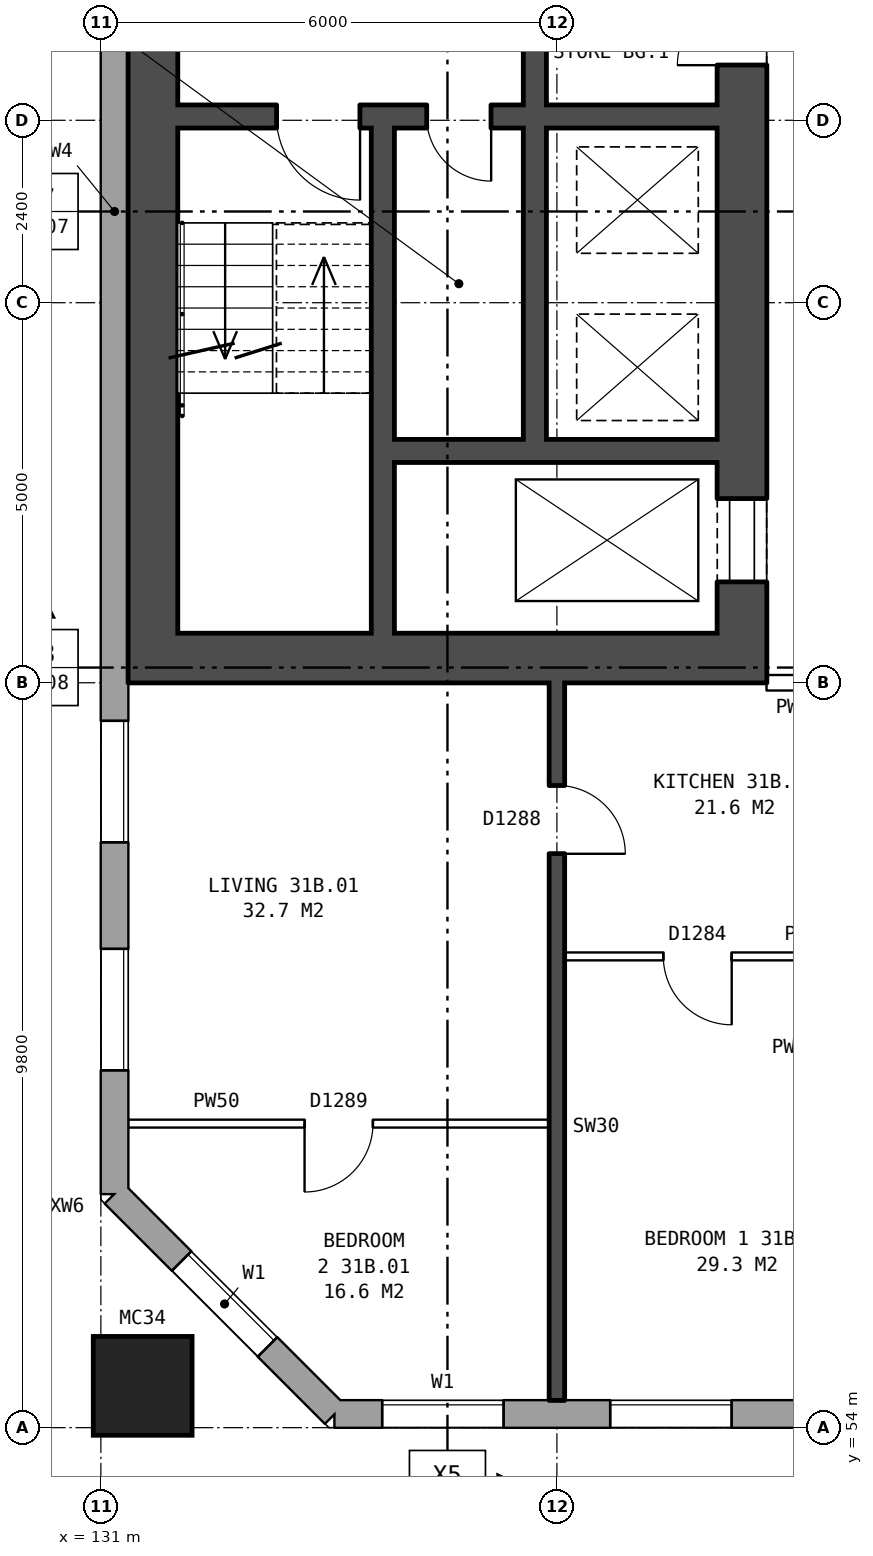
"""IFC4 building model, lengths in metres.
Left out: names, types, materials, properties, quantities, classifications, styles, units other than length and angle.
Written with IfcOpenShell. Run it as: python <this file> out.ifc"""

import sys

from ifc_helpers import new_model, si_unit, direction, frame, frame_2d, origin, origin_2d, place, context, subcontext, project, spatial, rectangle, hollow_rectangle, extrude, element, fill, save


model = new_model("IFC4")
c1 = context("Model", 3, precision=1e-05, world=origin(), true_north=direction((0.0, 1.0)))
c2 = subcontext(c1, "Body", "Model", "MODEL_VIEW")
j1 = project(units=[si_unit("LENGTHUNIT", "METRE"), si_unit("PLANEANGLEUNIT", "RADIAN")], contexts=[c1])
p1 = place(None, origin())
s1 = spatial("IfcSite", under=j1, at=p1, CompositionType="ELEMENT")
p2 = place(p1, origin())
s2 = spatial("IfcBuilding", under=s1, at=p2, CompositionType="ELEMENT")
p3 = place(p2, frame((0.0, 0.0, 111.9)))
s3 = spatial("IfcBuildingStorey", under=s2, at=p3, CompositionType="ELEMENT", Elevation=111.9)
p4 = place(p3, frame((131.55, 54.55, 0.0), z_axis=(0.0, 0.0, 1.0), x_axis=(1.0, 0.0, 0.0)))
e1 = element("IfcColumn", 1, at=p4, inside=s3, PredefinedType="COLUMN", context=c2, shape_type="SweptSolid", body=[
    extrude(hollow_rectangle(XDim=1.3, YDim=1.3, WallThickness=0.07, at=origin_2d()), origin(), (0.0, 0.0, 1.0), 3.1),
])
p5 = place(p3, frame((131.18, 57.075, 0.0), z_axis=(0.0, 0.0, 1.0), x_axis=(0.707106781187, -0.707106781187, 0.0)))
e2 = element("IfcWall", 2, at=p5, inside=s3, PredefinedType="STANDARD", context=c2, shape_type="SweptSolid", body=[
    extrude(rectangle(XDim=4.094, YDim=0.36, at=frame_2d((2.047, 0.0))), origin(), (0.0, 0.0, 1.0), 2.85),
])
p6 = place(p5, frame((1.247, 0.0, 0.8)))
e3 = element("IfcOpeningElement", 3, at=p6, cuts=e2, PredefinedType="OPENING", context=c2, shape_type="SweptSolid", body=[
    extrude(rectangle(XDim=1.6, YDim=1.8, at=frame_2d((0.8, 0.9))), frame((0.0, 0.19, 0.0), z_axis=(0.0, -1.0, 0.0), x_axis=(1.0, 0.0, 0.0)), (0.0, 0.0, 1.0), 0.38),
])
p7 = place(p3, frame((134.075, 54.18, 0.0), z_axis=(0.0, 0.0, 1.0), x_axis=(1.0, 0.0, 0.0)))
e4 = element("IfcWall", 4, at=p7, inside=s3, PredefinedType="STANDARD", context=c2, shape_type="SweptSolid", body=[
    extrude(rectangle(XDim=36.851, YDim=0.36, at=frame_2d((18.425, 0.0))), origin(), (0.0, 0.0, 1.0), 2.85),
])
p8 = place(p7, frame((0.625, 0.0, 0.8)))
e5 = element("IfcOpeningElement", 5, at=p8, cuts=e4, PredefinedType="OPENING", context=c2, shape_type="SweptSolid", body=[
    extrude(rectangle(XDim=1.6, YDim=1.8, at=frame_2d((0.8, 0.9))), frame((0.0, 0.19, 0.0), z_axis=(0.0, -1.0, 0.0), x_axis=(1.0, 0.0, 0.0)), (0.0, 0.0, 1.0), 0.38),
])
p9 = place(p7, frame((3.625, 0.0, 0.8)))
e6 = element("IfcOpeningElement", 6, at=p9, cuts=e4, PredefinedType="OPENING", context=c2, shape_type="SweptSolid", body=[
    extrude(rectangle(XDim=1.6, YDim=1.8, at=frame_2d((0.8, 0.9))), frame((0.0, 0.19, 0.0), z_axis=(0.0, -1.0, 0.0), x_axis=(1.0, 0.0, 0.0)), (0.0, 0.0, 1.0), 0.38),
])
p10 = place(p7, frame((6.625, 0.0, 0.8)))
e7 = element("IfcOpeningElement", 7, at=p10, cuts=e4, PredefinedType="OPENING", context=c2, shape_type="SweptSolid", body=[
    extrude(rectangle(XDim=1.6, YDim=1.8, at=frame_2d((0.8, 0.9))), frame((0.0, 0.19, 0.0), z_axis=(0.0, -1.0, 0.0), x_axis=(1.0, 0.0, 0.0)), (0.0, 0.0, 1.0), 0.38),
])
p11 = place(p7, frame((9.625, 0.0, 0.8)))
e8 = element("IfcOpeningElement", 8, at=p11, cuts=e4, PredefinedType="OPENING", context=c2, shape_type="SweptSolid", body=[
    extrude(rectangle(XDim=1.6, YDim=1.8, at=frame_2d((0.8, 0.9))), frame((0.0, 0.19, 0.0), z_axis=(0.0, -1.0, 0.0), x_axis=(1.0, 0.0, 0.0)), (0.0, 0.0, 1.0), 0.38),
])
p12 = place(p7, frame((12.625, 0.0, 0.8)))
e9 = element("IfcOpeningElement", 9, at=p12, cuts=e4, PredefinedType="OPENING", context=c2, shape_type="SweptSolid", body=[
    extrude(rectangle(XDim=1.6, YDim=1.8, at=frame_2d((0.8, 0.9))), frame((0.0, 0.19, 0.0), z_axis=(0.0, -1.0, 0.0), x_axis=(1.0, 0.0, 0.0)), (0.0, 0.0, 1.0), 0.38),
])
p13 = place(p7, frame((15.125, 0.0, 1.35)))
e10 = element("IfcOpeningElement", 10, at=p13, cuts=e4, PredefinedType="OPENING", context=c2, shape_type="SweptSolid", body=[
    extrude(rectangle(XDim=1.2, YDim=1.2, at=frame_2d((0.6, 0.6))), frame((0.0, 0.19, 0.0), z_axis=(0.0, -1.0, 0.0), x_axis=(1.0, 0.0, 0.0)), (0.0, 0.0, 1.0), 0.38),
])
p14 = place(p7, frame((18.075, 0.0, 0.25)))
e11 = element("IfcOpeningElement", 11, at=p14, cuts=e4, PredefinedType="OPENING", context=c2, shape_type="SweptSolid", body=[
    extrude(rectangle(XDim=0.8, YDim=1.5, at=frame_2d((0.4, 0.75))), frame((0.0, 0.19, 0.0), z_axis=(0.0, -1.0, 0.0), x_axis=(1.0, 0.0, 0.0)), (0.0, 0.0, 1.0), 0.38),
])
p15 = place(p7, frame((21.625, 0.0, 0.8)))
e12 = element("IfcOpeningElement", 12, at=p15, cuts=e4, PredefinedType="OPENING", context=c2, shape_type="SweptSolid", body=[
    extrude(rectangle(XDim=1.6, YDim=1.8, at=frame_2d((0.8, 0.9))), frame((0.0, 0.19, 0.0), z_axis=(0.0, -1.0, 0.0), x_axis=(1.0, 0.0, 0.0)), (0.0, 0.0, 1.0), 0.38),
])
p16 = place(p7, frame((24.625, 0.0, 0.8)))
e13 = element("IfcOpeningElement", 13, at=p16, cuts=e4, PredefinedType="OPENING", context=c2, shape_type="SweptSolid", body=[
    extrude(rectangle(XDim=1.6, YDim=1.8, at=frame_2d((0.8, 0.9))), frame((0.0, 0.19, 0.0), z_axis=(0.0, -1.0, 0.0), x_axis=(1.0, 0.0, 0.0)), (0.0, 0.0, 1.0), 0.38),
])
p17 = place(p7, frame((27.625, 0.0, 0.8)))
e14 = element("IfcOpeningElement", 14, at=p17, cuts=e4, PredefinedType="OPENING", context=c2, shape_type="SweptSolid", body=[
    extrude(rectangle(XDim=1.6, YDim=1.8, at=frame_2d((0.8, 0.9))), frame((0.0, 0.19, 0.0), z_axis=(0.0, -1.0, 0.0), x_axis=(1.0, 0.0, 0.0)), (0.0, 0.0, 1.0), 0.38),
])
p18 = place(p7, frame((30.625, 0.0, 0.8)))
e15 = element("IfcOpeningElement", 15, at=p18, cuts=e4, PredefinedType="OPENING", context=c2, shape_type="SweptSolid", body=[
    extrude(rectangle(XDim=1.6, YDim=1.8, at=frame_2d((0.8, 0.9))), frame((0.0, 0.19, 0.0), z_axis=(0.0, -1.0, 0.0), x_axis=(1.0, 0.0, 0.0)), (0.0, 0.0, 1.0), 0.38),
])
p19 = place(p7, frame((33.625, 0.0, 0.8)))
e16 = element("IfcOpeningElement", 16, at=p19, cuts=e4, PredefinedType="OPENING", context=c2, shape_type="SweptSolid", body=[
    extrude(rectangle(XDim=1.6, YDim=1.8, at=frame_2d((0.8, 0.9))), frame((0.0, 0.19, 0.0), z_axis=(0.0, -1.0, 0.0), x_axis=(1.0, 0.0, 0.0)), (0.0, 0.0, 1.0), 0.38),
])
p20 = place(p7, frame((17.075, 0.0, 0.15)))
e17 = element("IfcOpeningElement", 17, at=p20, cuts=e4, PredefinedType="OPENING", context=c2, shape_type="SweptSolid", body=[
    extrude(rectangle(XDim=0.6, YDim=0.9, at=frame_2d((0.3, 0.45))), frame((0.0, 0.19, 0.0), z_axis=(0.0, -1.0, 0.0), x_axis=(1.0, 0.0, 0.0)), (0.0, 0.0, 1.0), 0.38),
])
p21 = place(p7, frame((19.175, 0.0, 0.15)))
e18 = element("IfcOpeningElement", 18, at=p21, cuts=e4, PredefinedType="OPENING", context=c2, shape_type="SweptSolid", body=[
    extrude(rectangle(XDim=0.6, YDim=0.9, at=frame_2d((0.3, 0.45))), frame((0.0, 0.19, 0.0), z_axis=(0.0, -1.0, 0.0), x_axis=(1.0, 0.0, 0.0)), (0.0, 0.0, 1.0), 0.38),
])
p22 = place(p3, frame((131.18, 82.925, 0.0), z_axis=(0.0, 0.0, 1.0), x_axis=(0.0, -1.0, 0.0)))
e19 = element("IfcWall", 19, at=p22, inside=s3, PredefinedType="STANDARD", context=c2, shape_type="SweptSolid", body=[
    extrude(rectangle(XDim=25.851, YDim=0.36, at=frame_2d((12.925, 0.0))), origin(), (0.0, 0.0, 1.0), 2.85),
])
p23 = place(p22, frame((1.625, 0.0, 0.8)))
e20 = element("IfcOpeningElement", 20, at=p23, cuts=e19, PredefinedType="OPENING", context=c2, shape_type="SweptSolid", body=[
    extrude(rectangle(XDim=1.6, YDim=1.8, at=frame_2d((0.8, 0.9))), frame((0.0, 0.19, 0.0), z_axis=(0.0, -1.0, 0.0), x_axis=(1.0, 0.0, 0.0)), (0.0, 0.0, 1.0), 0.38),
])
p24 = place(p22, frame((4.625, 0.0, 0.8)))
e21 = element("IfcOpeningElement", 21, at=p24, cuts=e19, PredefinedType="OPENING", context=c2, shape_type="SweptSolid", body=[
    extrude(rectangle(XDim=1.6, YDim=1.8, at=frame_2d((0.8, 0.9))), frame((0.0, 0.19, 0.0), z_axis=(0.0, -1.0, 0.0), x_axis=(1.0, 0.0, 0.0)), (0.0, 0.0, 1.0), 0.38),
])
p25 = place(p22, frame((19.625, 0.0, 0.8)))
e22 = element("IfcOpeningElement", 22, at=p25, cuts=e19, PredefinedType="OPENING", context=c2, shape_type="SweptSolid", body=[
    extrude(rectangle(XDim=1.6, YDim=1.8, at=frame_2d((0.8, 0.9))), frame((0.0, 0.19, 0.0), z_axis=(0.0, -1.0, 0.0), x_axis=(1.0, 0.0, 0.0)), (0.0, 0.0, 1.0), 0.38),
])
p26 = place(p22, frame((22.625, 0.0, 0.8)))
e23 = element("IfcOpeningElement", 23, at=p26, cuts=e19, PredefinedType="OPENING", context=c2, shape_type="SweptSolid", body=[
    extrude(rectangle(XDim=1.6, YDim=1.8, at=frame_2d((0.8, 0.9))), frame((0.0, 0.19, 0.0), z_axis=(0.0, -1.0, 0.0), x_axis=(1.0, 0.0, 0.0)), (0.0, 0.0, 1.0), 0.38),
])
p27 = place(p3, frame((139.435, 64.45, 0.0), z_axis=(0.0, 0.0, 1.0), x_axis=(0.0, 1.0, 0.0)))
e24 = element("IfcWall", 24, at=p27, inside=s3, PredefinedType="SHEAR", context=c2, shape_type="SweptSolid", body=[
    extrude(rectangle(XDim=11.1, YDim=0.65, at=frame_2d((5.55, 0.0))), origin(), (0.0, 0.0, 1.0), 2.85),
])
p28 = place(p27, frame((0.675, 0.0, 0.0)))
e25 = element("IfcOpeningElement", 25, at=p28, cuts=e24, PredefinedType="OPENING", context=c2, shape_type="SweptSolid", body=[
    extrude(rectangle(XDim=1.1, YDim=2.1, at=frame_2d((0.55, 1.05))), frame((0.0, 0.335, 0.0), z_axis=(0.0, -1.0, 0.0), x_axis=(1.0, 0.0, 0.0)), (0.0, 0.0, 1.0), 0.67),
])
p29 = place(p27, frame((9.25, 0.0, 0.0)))
e26 = element("IfcOpeningElement", 26, at=p29, cuts=e24, PredefinedType="OPENING", context=c2, shape_type="SweptSolid", body=[
    extrude(rectangle(XDim=1.1, YDim=2.1, at=frame_2d((0.55, 1.05))), frame((0.0, 0.335, 0.0), z_axis=(0.0, -1.0, 0.0), x_axis=(1.0, 0.0, 0.0)), (0.0, 0.0, 1.0), 0.67),
])
p30 = place(p27, frame((7.475, 0.0, 0.0)))
e27 = element("IfcOpeningElement", 27, at=p30, cuts=e24, PredefinedType="OPENING", context=c2, shape_type="SweptSolid", body=[
    extrude(rectangle(XDim=0.85, YDim=2.1, at=frame_2d((0.425, 1.05))), frame((0.0, 0.335, 0.0), z_axis=(0.0, -1.0, 0.0), x_axis=(1.0, 0.0, 0.0)), (0.0, 0.0, 1.0), 0.67),
])
p31 = place(p3, frame((131.685, 64.45, 0.0), z_axis=(0.0, 0.0, 1.0), x_axis=(0.0, 1.0, 0.0)))
e28 = element("IfcWall", 28, at=p31, inside=s3, PredefinedType="SHEAR", context=c2, shape_type="SweptSolid", body=[
    extrude(rectangle(XDim=11.1, YDim=0.65, at=frame_2d((5.55, 0.0))), origin(), (0.0, 0.0, 1.0), 2.85),
])
p32 = place(p3, frame((139.76, 64.125, 0.0), z_axis=(0.0, 0.0, 1.0), x_axis=(-1.0, 0.0, 0.0)))
e29 = element("IfcWall", 29, at=p32, inside=s3, PredefinedType="SHEAR", context=c2, shape_type="SweptSolid", body=[
    extrude(rectangle(XDim=8.4, YDim=0.65, at=frame_2d((4.2, 0.0))), origin(), (0.0, 0.0, 1.0), 2.85),
])
p33 = place(p3, frame((139.11, 66.85, 0.0), z_axis=(0.0, 0.0, 1.0), x_axis=(-1.0, 0.0, 0.0)))
e30 = element("IfcWall", 30, at=p33, inside=s3, PredefinedType="SHEAR", context=c2, shape_type="SweptSolid", body=[
    extrude(rectangle(XDim=4.25, YDim=0.3, at=frame_2d((2.125, 0.0))), origin(), (0.0, 0.0, 1.0), 2.85),
])
p34 = place(p3, frame((139.11, 71.25, 0.0), z_axis=(0.0, 0.0, 1.0), x_axis=(-1.0, 0.0, 0.0)))
e31 = element("IfcWall", 31, at=p34, inside=s3, PredefinedType="SHEAR", context=c2, shape_type="SweptSolid", body=[
    extrude(rectangle(XDim=7.1, YDim=0.3, at=frame_2d((3.55, 0.0))), origin(), (0.0, 0.0, 1.0), 2.85),
])
p35 = place(p34, frame((4.7, 0.0, 0.0)))
e32 = element("IfcOpeningElement", 32, at=p35, cuts=e31, PredefinedType="OPENING", context=c2, shape_type="SweptSolid", body=[
    extrude(rectangle(XDim=1.1, YDim=2.1, at=frame_2d((0.55, 1.05))), frame((0.0, 0.16, 0.0), z_axis=(0.0, -1.0, 0.0), x_axis=(1.0, 0.0, 0.0)), (0.0, 0.0, 1.0), 0.32),
])
p36 = place(p34, frame((2.975, 0.0, 0.0)))
e33 = element("IfcOpeningElement", 33, at=p36, cuts=e31, PredefinedType="OPENING", context=c2, shape_type="SweptSolid", body=[
    extrude(rectangle(XDim=0.85, YDim=2.1, at=frame_2d((0.425, 1.05))), frame((0.0, 0.16, 0.0), z_axis=(0.0, -1.0, 0.0), x_axis=(1.0, 0.0, 0.0)), (0.0, 0.0, 1.0), 0.32),
])
p37 = place(p3, frame((136.71, 67.0, 0.0), z_axis=(0.0, 0.0, 1.0), x_axis=(0.0, 1.0, 0.0)))
e34 = element("IfcWall", 34, at=p37, inside=s3, PredefinedType="SHEAR", context=c2, shape_type="SweptSolid", body=[
    extrude(rectangle(XDim=4.1, YDim=0.3, at=frame_2d((2.05, 0.0))), origin(), (0.0, 0.0, 1.0), 2.85),
])
p38 = place(p3, frame((136.71, 71.4, 0.0), z_axis=(0.0, 0.0, 1.0), x_axis=(0.0, 1.0, 0.0)))
e35 = element("IfcWall", 35, at=p38, inside=s3, PredefinedType="SHEAR", context=c2, shape_type="SweptSolid", body=[
    extrude(rectangle(XDim=2.2, YDim=0.3, at=frame_2d((1.1, 0.0))), origin(), (0.0, 0.0, 1.0), 2.85),
])
p39 = place(p3, frame((134.71, 64.45, 0.0), z_axis=(0.0, 0.0, 1.0), x_axis=(0.0, 1.0, 0.0)))
e36 = element("IfcWall", 36, at=p39, inside=s3, PredefinedType="SHEAR", context=c2, shape_type="SweptSolid", body=[
    extrude(rectangle(XDim=6.65, YDim=0.3, at=frame_2d((3.325, 0.0))), origin(), (0.0, 0.0, 1.0), 2.85),
])
p40 = place(p3, frame((131.36, 58.0, 0.0), z_axis=(0.0, 0.0, 1.0), x_axis=(1.0, 0.0, 0.0)))
e37 = element("IfcWall", 37, at=p40, inside=s3, PredefinedType="PARTITIONING", context=c2, shape_type="SweptSolid", body=[
    extrude(rectangle(XDim=5.54, YDim=0.1, at=frame_2d((2.77, 0.0))), origin(), (0.0, 0.0, 1.0), 2.85),
])
p41 = place(p40, frame((2.32, 0.0, 0.0)))
e38 = element("IfcOpeningElement", 38, at=p41, cuts=e37, PredefinedType="OPENING", context=c2, shape_type="SweptSolid", body=[
    extrude(rectangle(XDim=0.9, YDim=2.1, at=frame_2d((0.45, 1.05))), frame((0.0, 0.06, 0.0), z_axis=(0.0, -1.0, 0.0), x_axis=(1.0, 0.0, 0.0)), (0.0, 0.0, 1.0), 0.12),
])
p42 = place(p3, frame((137.1, 60.2, 0.0), z_axis=(0.0, 0.0, 1.0), x_axis=(1.0, 0.0, 0.0)))
e39 = element("IfcWall", 39, at=p42, inside=s3, PredefinedType="PARTITIONING", context=c2, shape_type="SweptSolid", body=[
    extrude(rectangle(XDim=5.8, YDim=0.1, at=frame_2d((2.9, 0.0))), origin(), (0.0, 0.0, 1.0), 2.85),
])
p43 = place(p42, frame((1.3, 0.0, 0.0)))
e40 = element("IfcOpeningElement", 40, at=p43, cuts=e39, PredefinedType="OPENING", context=c2, shape_type="SweptSolid", body=[
    extrude(rectangle(XDim=0.9, YDim=2.1, at=frame_2d((0.45, 1.05))), frame((0.0, 0.06, 0.0), z_axis=(0.0, -1.0, 0.0), x_axis=(1.0, 0.0, 0.0)), (0.0, 0.0, 1.0), 0.12),
])
p44 = place(p42, frame((4.2, 0.0, 0.0)))
e41 = element("IfcOpeningElement", 41, at=p44, cuts=e39, PredefinedType="OPENING", context=c2, shape_type="SweptSolid", body=[
    extrude(rectangle(XDim=0.9, YDim=2.1, at=frame_2d((0.45, 1.05))), frame((0.0, 0.06, 0.0), z_axis=(0.0, -1.0, 0.0), x_axis=(1.0, 0.0, 0.0)), (0.0, 0.0, 1.0), 0.12),
])
p45 = place(p3, frame((139.76, 63.8, 0.0), z_axis=(0.0, 0.0, 1.0), x_axis=(1.0, 0.0, 0.0)))
e42 = element("IfcWall", 42, at=p45, inside=s3, PredefinedType="PARTITIONING", context=c2, shape_type="SweptSolid", body=[
    extrude(rectangle(XDim=3.0, YDim=0.2, at=frame_2d((1.5, 0.0))), origin(), (0.0, 0.0, 1.0), 2.85),
])
p46 = place(p45, frame((1.0, 0.0, 0.0)))
e43 = element("IfcOpeningElement", 43, at=p46, cuts=e42, PredefinedType="OPENING", context=c2, shape_type="SweptSolid", body=[
    extrude(rectangle(XDim=1.0, YDim=2.1, at=frame_2d((0.5, 1.05))), frame((0.0, 0.11, 0.0), z_axis=(0.0, -1.0, 0.0), x_axis=(1.0, 0.0, 0.0)), (0.0, 0.0, 1.0), 0.22),
])
p47 = place(p3, frame((137.0, 54.36, 0.0), z_axis=(0.0, 0.0, 1.0), x_axis=(0.0, 1.0, 0.0)))
e44 = element("IfcWall", 44, at=p47, inside=s3, PredefinedType="SOLIDWALL", context=c2, shape_type="SweptSolid", body=[
    extrude(rectangle(XDim=9.44, YDim=0.2, at=frame_2d((4.72, 0.0))), origin(), (0.0, 0.0, 1.0), 2.85),
])
p48 = place(p47, frame((7.19, 0.0, 0.0)))
e45 = element("IfcOpeningElement", 45, at=p48, cuts=e44, PredefinedType="OPENING", context=c2, shape_type="SweptSolid", body=[
    extrude(rectangle(XDim=0.9, YDim=2.1, at=frame_2d((0.45, 1.05))), frame((0.0, 0.11, 0.0), z_axis=(0.0, -1.0, 0.0), x_axis=(1.0, 0.0, 0.0)), (0.0, 0.0, 1.0), 0.22),
])
p49 = place(p6, origin())
e46 = element("IfcWindow", 46, at=p49, inside=s3, PartitioningType="SINGLE_PANEL", PredefinedType="WINDOW", context=c2, shape_type="SweptSolid", body=[
    extrude(rectangle(XDim=1.6, YDim=1.8, at=frame_2d((0.8, 0.9))), frame((0.0, 0.15, 0.0), z_axis=(0.0, -1.0, 0.0), x_axis=(1.0, 0.0, 0.0)), (0.0, 0.0, 1.0), 0.06),
])
fill(e3, e46)
p50 = place(p8, origin())
e47 = element("IfcWindow", 47, at=p50, inside=s3, PartitioningType="SINGLE_PANEL", PredefinedType="WINDOW", context=c2, shape_type="SweptSolid", body=[
    extrude(rectangle(XDim=1.6, YDim=1.8, at=frame_2d((0.8, 0.9))), frame((0.0, 0.15, 0.0), z_axis=(0.0, -1.0, 0.0), x_axis=(1.0, 0.0, 0.0)), (0.0, 0.0, 1.0), 0.06),
])
fill(e5, e47)
p51 = place(p9, origin())
e48 = element("IfcWindow", 48, at=p51, inside=s3, PartitioningType="SINGLE_PANEL", PredefinedType="WINDOW", context=c2, shape_type="SweptSolid", body=[
    extrude(rectangle(XDim=1.6, YDim=1.8, at=frame_2d((0.8, 0.9))), frame((0.0, 0.15, 0.0), z_axis=(0.0, -1.0, 0.0), x_axis=(1.0, 0.0, 0.0)), (0.0, 0.0, 1.0), 0.06),
])
fill(e6, e48)
p52 = place(p25, origin())
e49 = element("IfcWindow", 49, at=p52, inside=s3, PartitioningType="SINGLE_PANEL", PredefinedType="WINDOW", context=c2, shape_type="SweptSolid", body=[
    extrude(rectangle(XDim=1.6, YDim=1.8, at=frame_2d((0.8, 0.9))), frame((0.0, 0.15, 0.0), z_axis=(0.0, -1.0, 0.0), x_axis=(1.0, 0.0, 0.0)), (0.0, 0.0, 1.0), 0.06),
])
fill(e22, e49)
p53 = place(p26, origin())
e50 = element("IfcWindow", 50, at=p53, inside=s3, PartitioningType="SINGLE_PANEL", PredefinedType="WINDOW", context=c2, shape_type="SweptSolid", body=[
    extrude(rectangle(XDim=1.6, YDim=1.8, at=frame_2d((0.8, 0.9))), frame((0.0, 0.15, 0.0), z_axis=(0.0, -1.0, 0.0), x_axis=(1.0, 0.0, 0.0)), (0.0, 0.0, 1.0), 0.06),
])
fill(e23, e50)
p54 = place(p28, origin())
e51 = element("IfcDoor", 51, at=p54, inside=s3, OperationType="DOUBLE_DOOR_SLIDING", PredefinedType="DOOR", context=c2, shape_type="SweptSolid", body=[
    extrude(rectangle(XDim=1.1, YDim=2.1, at=frame_2d((0.55, 1.05))), frame((0.0, 0.31, 0.0), z_axis=(0.0, -1.0, 0.0), x_axis=(1.0, 0.0, 0.0)), (0.0, 0.0, 1.0), 0.05),
])
fill(e25, e51)
p55 = place(p35, origin())
e52 = element("IfcDoor", 52, at=p55, inside=s3, OperationType="SINGLE_SWING_LEFT", PredefinedType="DOOR", context=c2, shape_type="SweptSolid", body=[
    extrude(rectangle(XDim=1.1, YDim=2.1, at=frame_2d((0.55, 1.05))), frame((0.0, 0.025, 0.0), z_axis=(0.0, -1.0, 0.0), x_axis=(1.0, 0.0, 0.0)), (0.0, 0.0, 1.0), 0.05),
])
fill(e32, e52)
p56 = place(p30, origin())
e53 = element("IfcDoor", 53, at=p56, inside=s3, OperationType="SINGLE_SWING_LEFT", PredefinedType="DOOR", context=c2, shape_type="SweptSolid", body=[
    extrude(rectangle(XDim=0.85, YDim=2.1, at=frame_2d((0.425, 1.05))), frame((0.0, 0.31, 0.0), z_axis=(0.0, -1.0, 0.0), x_axis=(1.0, 0.0, 0.0)), (0.0, 0.0, 1.0), 0.05),
])
fill(e27, e53)
p57 = place(p36, origin())
e54 = element("IfcDoor", 54, at=p57, inside=s3, OperationType="SINGLE_SWING_LEFT", PredefinedType="DOOR", context=c2, shape_type="SweptSolid", body=[
    extrude(rectangle(XDim=0.85, YDim=2.1, at=frame_2d((0.425, 1.05))), frame((0.0, 0.025, 0.0), z_axis=(0.0, -1.0, 0.0), x_axis=(1.0, 0.0, 0.0)), (0.0, 0.0, 1.0), 0.05),
])
fill(e33, e54)
p58 = place(p43, frame((0.9, 0.0, 0.0), z_axis=(0.0, 0.0, 1.0), x_axis=(-1.0, 0.0, 0.0)))
e55 = element("IfcDoor", 55, at=p58, inside=s3, OperationType="SINGLE_SWING_LEFT", PredefinedType="DOOR", context=c2, shape_type="SweptSolid", body=[
    extrude(rectangle(XDim=0.9, YDim=2.1, at=frame_2d((0.45, 1.05))), frame((0.0, 0.025, 0.0), z_axis=(0.0, -1.0, 0.0), x_axis=(1.0, 0.0, 0.0)), (0.0, 0.0, 1.0), 0.05),
])
fill(e40, e55)
p59 = place(p41, frame((0.9, 0.0, 0.0), z_axis=(0.0, 0.0, 1.0), x_axis=(-1.0, 0.0, 0.0)))
e56 = element("IfcDoor", 56, at=p59, inside=s3, OperationType="SINGLE_SWING_RIGHT", PredefinedType="DOOR", context=c2, shape_type="SweptSolid", body=[
    extrude(rectangle(XDim=0.9, YDim=2.1, at=frame_2d((0.45, 1.05))), frame((0.0, 0.025, 0.0), z_axis=(0.0, -1.0, 0.0), x_axis=(1.0, 0.0, 0.0)), (0.0, 0.0, 1.0), 0.05),
])
fill(e38, e56)
p60 = place(p48, frame((0.9, 0.0, 0.0), z_axis=(0.0, 0.0, 1.0), x_axis=(-1.0, 0.0, 0.0)))
e57 = element("IfcDoor", 57, at=p60, inside=s3, OperationType="SINGLE_SWING_RIGHT", PredefinedType="DOOR", context=c2, shape_type="SweptSolid", body=[
    extrude(rectangle(XDim=0.9, YDim=2.1, at=frame_2d((0.45, 1.05))), frame((0.0, 0.025, 0.0), z_axis=(0.0, -1.0, 0.0), x_axis=(1.0, 0.0, 0.0)), (0.0, 0.0, 1.0), 0.05),
])
fill(e45, e57)
save(model, sys.argv[1])
